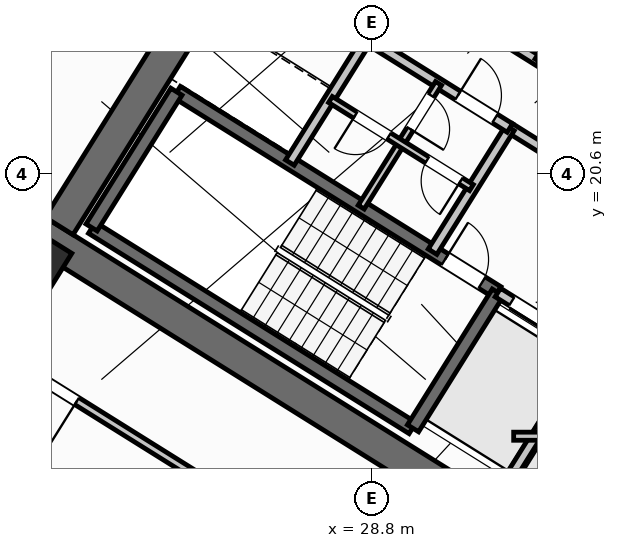
"""IFC4 building model, lengths in metres.
Left out: names, types, materials, properties, quantities, classifications, styles, units other than length and angle.
Written with IfcOpenShell. Run it as: python <this file> out.ifc"""

import sys

from ifc_helpers import new_model, si_unit, direction, frame, frame_2d, origin, origin_2d, place, context, subcontext, project, spatial, rectangle, hollow_rectangle, extrude, source, transform, mapped, element, fill, save


model = new_model("IFC4")
c1 = context("Model", 3, precision=1e-05, world=origin(), true_north=direction((0.0, 1.0)))
c2 = subcontext(c1, "Body", "Model", "MODEL_VIEW")
j1 = project(units=[si_unit("LENGTHUNIT", "METRE"), si_unit("PLANEANGLEUNIT", "RADIAN")], contexts=[c1])
p1 = place(None, origin())
s1 = spatial("IfcSite", under=j1, at=p1, CompositionType="ELEMENT")
p2 = place(p1, origin())
s2 = spatial("IfcBuilding", under=s1, at=p2, CompositionType="ELEMENT")
p3 = place(p2, frame((0.0, 0.0, 52.8)))
s3 = spatial("IfcBuildingStorey", under=s2, at=p3, CompositionType="ELEMENT", Elevation=52.8)
p4 = place(p3, frame((33.409, 12.45, 0.0), z_axis=(0.0, 0.0, 1.0), x_axis=(-0.848051132073, 0.529914405721, 0.0)))
e1 = element("IfcWall", 1, at=p4, inside=s3, PredefinedType="SHEAR", context=c2, shape_type="SweptSolid", body=[
    extrude(rectangle(XDim=13.24, YDim=0.65, at=frame_2d((6.62, 0.0))), origin(), (0.0, 0.0, 1.0), 3.35),
])
p5 = place(p3, frame((26.007, 24.976, 0.0), z_axis=(0.0, 0.0, 1.0), x_axis=(-0.529916319127, -0.848049936456, 0.0)))
e2 = element("IfcWall", 2, at=p5, inside=s3, PredefinedType="SHEAR", context=c2, shape_type="SweptSolid", body=[
    extrude(rectangle(XDim=6.375, YDim=0.65, at=frame_2d((3.188, 0.0))), origin(), (0.0, 0.0, 1.0), 3.35),
])
m1 = source(origin(), c2, "Body", "SweptSolid", [
    extrude(hollow_rectangle(XDim=1.0, YDim=1.0, WallThickness=0.04, at=origin_2d()), origin(), (0.0, 0.0, 1.0), 3.6),
])
p6 = place(p3, frame((22.191, 18.87, 0.0), z_axis=(0.0, 0.0, 1.0), x_axis=(-0.848048096156, 0.529919264233, 0.0)))
e3 = element("IfcColumn", 3, at=p6, inside=s3, PredefinedType="COLUMN", context=c2, shape_type="MappedRepresentation", body=[
    mapped(m1, transform((0.0, 0.0, 0.0), scale=1.0)),
])
p7 = place(p3, frame((29.268, 6.429, 0.0), z_axis=(0.0, 0.0, 1.0), x_axis=(-0.848049971435, 0.529916263149, 0.0)))
e4 = element("IfcWall", 4, at=p7, inside=s3, PredefinedType="STANDARD", context=c2, shape_type="SweptSolid", body=[
    extrude(rectangle(XDim=31.588, YDim=0.32, at=frame_2d((15.794, 0.0))), origin(), (0.0, 0.0, 1.0), 3.35),
])
p8 = place(p7, frame((16.362, 0.0, 0.0)))
e5 = element("IfcOpeningElement", 5, at=p8, cuts=e4, PredefinedType="OPENING", context=c2, shape_type="SweptSolid", body=[
    extrude(rectangle(XDim=1.2, YDim=2.15, at=frame_2d((0.6, 1.075))), frame((0.0, 0.17, 0.0), z_axis=(0.0, -1.0, 0.0), x_axis=(1.0, 0.0, 0.0)), (0.0, 0.0, 1.0), 0.34),
])
p9 = place(p7, frame((2.989, 0.0, 0.8)))
e6 = element("IfcOpeningElement", 6, at=p9, cuts=e4, PredefinedType="OPENING", context=c2, shape_type="SweptSolid", body=[
    extrude(rectangle(XDim=2.1, YDim=1.55, at=frame_2d((1.05, 0.775))), frame((0.0, 0.17, 0.0), z_axis=(0.0, -1.0, 0.0), x_axis=(1.0, 0.0, 0.0)), (0.0, 0.0, 1.0), 0.34),
])
p10 = place(p7, frame((8.359, 0.0, 0.8)))
e7 = element("IfcOpeningElement", 7, at=p10, cuts=e4, PredefinedType="OPENING", context=c2, shape_type="SweptSolid", body=[
    extrude(rectangle(XDim=2.1, YDim=1.55, at=frame_2d((1.05, 0.775))), frame((0.0, 0.17, 0.0), z_axis=(0.0, -1.0, 0.0), x_axis=(1.0, 0.0, 0.0)), (0.0, 0.0, 1.0), 0.34),
])
p11 = place(p7, frame((13.284, 0.0, 0.95)))
e8 = element("IfcOpeningElement", 8, at=p11, cuts=e4, PredefinedType="OPENING", context=c2, shape_type="SweptSolid", body=[
    extrude(rectangle(XDim=1.2, YDim=1.4, at=frame_2d((0.6, 0.7))), frame((0.0, 0.17, 0.0), z_axis=(0.0, -1.0, 0.0), x_axis=(1.0, 0.0, 0.0)), (0.0, 0.0, 1.0), 0.34),
])
p12 = place(p7, frame((20.259, 0.0, 0.95)))
e9 = element("IfcOpeningElement", 9, at=p12, cuts=e4, PredefinedType="OPENING", context=c2, shape_type="SweptSolid", body=[
    extrude(rectangle(XDim=1.2, YDim=1.4, at=frame_2d((0.6, 0.7))), frame((0.0, 0.17, 0.0), z_axis=(0.0, -1.0, 0.0), x_axis=(1.0, 0.0, 0.0)), (0.0, 0.0, 1.0), 0.34),
])
p13 = place(p7, frame((22.929, 0.0, 0.95)))
e10 = element("IfcOpeningElement", 10, at=p13, cuts=e4, PredefinedType="OPENING", context=c2, shape_type="SweptSolid", body=[
    extrude(rectangle(XDim=1.2, YDim=1.4, at=frame_2d((0.6, 0.7))), frame((0.0, 0.17, 0.0), z_axis=(0.0, -1.0, 0.0), x_axis=(1.0, 0.0, 0.0)), (0.0, 0.0, 1.0), 0.34),
])
p14 = place(p7, frame((26.106, 0.0, 0.85)))
e11 = element("IfcOpeningElement", 11, at=p14, cuts=e4, PredefinedType="OPENING", context=c2, shape_type="SweptSolid", body=[
    extrude(rectangle(XDim=1.5, YDim=1.5, at=frame_2d((0.75, 0.75))), frame((0.0, 0.17, 0.0), z_axis=(0.0, -1.0, 0.0), x_axis=(1.0, 0.0, 0.0)), (0.0, 0.0, 1.0), 0.34),
])
p15 = place(p7, frame((29.068, 0.0, 0.85)))
e12 = element("IfcOpeningElement", 12, at=p15, cuts=e4, PredefinedType="OPENING", context=c2, shape_type="SweptSolid", body=[
    extrude(rectangle(XDim=1.8, YDim=1.5, at=frame_2d((0.9, 0.75))), frame((0.0, 0.17, 0.0), z_axis=(0.0, -1.0, 0.0), x_axis=(1.0, 0.0, 0.0)), (0.0, 0.0, 1.0), 0.34),
])
p16 = place(p3, frame((29.605, 15.581, 0.0), z_axis=(0.0, 0.0, 1.0), x_axis=(-0.848036911448, 0.529937163087, 0.0)))
e13 = element("IfcWall", 13, at=p16, inside=s3, PredefinedType="SHEAR", context=c2, shape_type="SweptSolid", body=[
    extrude(rectangle(XDim=7.46, YDim=0.26, at=frame_2d((3.73, 0.0))), origin(), (0.0, 0.0, 1.0), 3.35),
])
p17 = place(p3, frame((31.28, 18.261, 0.0), z_axis=(0.0, 0.0, 1.0), x_axis=(-0.848051618787, 0.529913626805, 0.0)))
e14 = element("IfcWall", 14, at=p17, inside=s3, PredefinedType="SHEAR", context=c2, shape_type="SweptSolid", body=[
    extrude(rectangle(XDim=7.46, YDim=0.26, at=frame_2d((3.73, 0.0))), origin(), (0.0, 0.0, 1.0), 3.35),
])
p18 = place(p17, frame((0.36, 0.0, 0.0)))
e15 = element("IfcOpeningElement", 15, at=p18, cuts=e14, PredefinedType="OPENING", context=c2, shape_type="SweptSolid", body=[
    extrude(rectangle(XDim=0.86, YDim=2.05, at=frame_2d((0.43, 1.025))), frame((0.0, 0.14, 0.0), z_axis=(0.0, -1.0, 0.0), x_axis=(1.0, 0.0, 0.0)), (0.0, 0.0, 1.0), 0.28),
])
p19 = place(p3, frame((31.288, 18.256, 0.0), z_axis=(0.0, 0.0, 1.0), x_axis=(-0.529943379326, -0.848033026897, 0.0)))
e16 = element("IfcWall", 16, at=p19, inside=s3, PredefinedType="SHEAR", context=c2, shape_type="SweptSolid", body=[
    extrude(rectangle(XDim=3.16, YDim=0.26, at=frame_2d((1.58, 0.0))), origin(), (0.0, 0.0, 1.0), 3.35),
])
p20 = place(p3, frame((24.945, 22.22, 0.0), z_axis=(0.0, 0.0, 1.0), x_axis=(-0.529908658664, -0.84805472316, 0.0)))
e17 = element("IfcWall", 17, at=p20, inside=s3, PredefinedType="SHEAR", context=c2, shape_type="SweptSolid", body=[
    extrude(rectangle(XDim=3.16, YDim=0.26, at=frame_2d((1.58, 0.0))), origin(), (0.0, 0.0, 1.0), 3.35),
])
p21 = place(p3, frame((38.046, 21.108, 0.0), z_axis=(0.0, 0.0, 1.0), x_axis=(-0.848054434086, 0.529909121291, 0.0)))
e18 = element("IfcWall", 18, at=p21, inside=s3, PredefinedType="SHEAR", context=c2, shape_type="SweptSolid", body=[
    extrude(rectangle(XDim=7.33, YDim=0.26, at=frame_2d((3.665, 0.0))), origin(), (0.0, 0.0, 1.0), 3.35),
])
p22 = place(p21, frame((0.22, 0.0, 0.0)))
e19 = element("IfcOpeningElement", 19, at=p22, cuts=e18, PredefinedType="OPENING", context=c2, shape_type="SweptSolid", body=[
    extrude(rectangle(XDim=1.1, YDim=2.1, at=frame_2d((0.55, 1.05))), frame((0.0, 0.14, 0.0), z_axis=(0.0, -1.0, 0.0), x_axis=(1.0, 0.0, 0.0)), (0.0, 0.0, 1.0), 0.28),
])
p23 = place(p3, frame((34.848, 16.031, 0.0), z_axis=(0.0, 0.0, 1.0), x_axis=(-0.848044042236, 0.529925751807, 0.0)))
e20 = element("IfcWall", 20, at=p23, inside=s3, PredefinedType="STANDARD", context=c2, shape_type="SweptSolid", body=[
    extrude(rectangle(XDim=4.198, YDim=0.2, at=frame_2d((2.099, 0.0))), origin(), (0.0, 0.0, 1.0), 3.34),
])
p24 = place(p23, frame((0.348, 0.0, 0.0)))
e21 = element("IfcOpeningElement", 21, at=p24, cuts=e20, PredefinedType="OPENING", context=c2, shape_type="SweptSolid", body=[
    extrude(rectangle(XDim=1.3, YDim=2.2, at=frame_2d((0.65, 1.1))), frame((0.0, 0.11, 0.0), z_axis=(0.0, -1.0, 0.0), x_axis=(1.0, 0.0, 0.0)), (0.0, 0.0, 1.0), 0.22),
])
p25 = place(p23, frame((2.423, 0.0, 0.0)))
e22 = element("IfcOpeningElement", 22, at=p25, cuts=e20, PredefinedType="OPENING", context=c2, shape_type="SweptSolid", body=[
    extrude(rectangle(XDim=1.45, YDim=2.25, at=frame_2d((0.725, 1.125))), frame((0.0, 0.11, 0.0), z_axis=(0.0, -1.0, 0.0), x_axis=(1.0, 0.0, 0.0)), (0.0, 0.0, 1.0), 0.22),
])
p26 = place(p3, frame((36.374, 18.474, 0.0), z_axis=(0.0, 0.0, 1.0), x_axis=(-0.848051071577, 0.529914502535, 0.0)))
e23 = element("IfcWall", 23, at=p26, inside=s3, PredefinedType="STANDARD", context=c2, shape_type="SweptSolid", body=[
    extrude(rectangle(XDim=5.718, YDim=0.2, at=frame_2d((2.859, 0.0))), origin(), (0.0, 0.0, 1.0), 3.34),
])
p27 = place(p26, frame((2.498, 0.0, 0.0)))
e24 = element("IfcOpeningElement", 24, at=p27, cuts=e23, PredefinedType="OPENING", context=c2, shape_type="SweptSolid", body=[
    extrude(rectangle(XDim=1.15, YDim=2.1, at=frame_2d((0.575, 1.05))), frame((0.0, 0.11, 0.0), z_axis=(0.0, -1.0, 0.0), x_axis=(1.0, 0.0, 0.0)), (0.0, 0.0, 1.0), 0.22),
])
p28 = place(p3, frame((32.108, 22.814, 0.0), z_axis=(0.0, 0.0, 1.0), x_axis=(-0.848042229521, 0.529928652696, 0.0)))
e25 = element("IfcWall", 25, at=p28, inside=s3, PredefinedType="STANDARD", context=c2, shape_type="SweptSolid", body=[
    extrude(rectangle(XDim=5.62, YDim=0.2, at=frame_2d((2.81, 0.0))), origin(), (0.0, 0.0, 1.0), 3.34),
])
p29 = place(p3, frame((32.982, 24.213, 0.0), z_axis=(0.0, 0.0, 1.0), x_axis=(-0.529839334948, -0.84809803628, 0.0)))
e26 = element("IfcWall", 26, at=p29, inside=s3, PredefinedType="STANDARD", context=c2, shape_type="SweptSolid", body=[
    extrude(rectangle(XDim=1.65, YDim=0.2, at=frame_2d((0.825, 0.0))), origin(), (0.0, 0.0, 1.0), 3.34),
])
p30 = place(p3, frame((33.029, 17.003, 0.0), z_axis=(0.0, 0.0, 1.0), x_axis=(-0.529916267533, -0.848049968695, 0.0)))
e27 = element("IfcWall", 27, at=p30, inside=s3, PredefinedType="STANDARD", context=c2, shape_type="SweptSolid", body=[
    extrude(rectangle(XDim=2.92, YDim=0.2, at=frame_2d((1.46, 0.0))), origin(), (0.0, 0.0, 1.0), 3.34),
])
for number, where, z_axis, x_axis in (
    (28, (31.525, 21.504, 0.0), (0.0, 0.0, 1.0), (-0.53, -0.848, 0.0)),
    (29, (28.71, 23.263, 0.0), (0.0, 0.0, 1.0), (-0.53, -0.848, 0.0)),
):
    element("IfcWall", number, at=place(p3, frame(where, z_axis=z_axis, x_axis=x_axis)), inside=s3, PredefinedType="STANDARD", context=c2, shape_type="SweptSolid", body=[
        extrude(rectangle(XDim=2.88, YDim=0.2, at=frame_2d((1.44, 0.0))), origin(), (0.0, 0.0, 1.0), 3.34),
    ])
p31 = place(p3, frame((31.525, 21.504, 0.0), z_axis=(0.0, 0.0, 1.0), x_axis=(-0.848044998614, 0.529924221305, 0.0)))
e30 = element("IfcWall", 30, at=p31, inside=s3, PredefinedType="STANDARD", context=c2, shape_type="SweptSolid", body=[
    extrude(rectangle(XDim=6.168, YDim=0.2, at=frame_2d((3.084, 0.0))), origin(), (0.0, 0.0, 1.0), 3.34),
])
p32 = place(p31, frame((4.4, 0.0, 0.0)))
e31 = element("IfcOpeningElement", 31, at=p32, cuts=e30, PredefinedType="OPENING", context=c2, shape_type="SweptSolid", body=[
    extrude(rectangle(XDim=0.86, YDim=2.05, at=frame_2d((0.43, 1.025))), frame((0.0, 0.11, 0.0), z_axis=(0.0, -1.0, 0.0), x_axis=(1.0, 0.0, 0.0)), (0.0, 0.0, 1.0), 0.22),
])
p33 = place(p31, frame((0.35, 0.0, 0.0)))
e32 = element("IfcOpeningElement", 32, at=p33, cuts=e30, PredefinedType="OPENING", context=c2, shape_type="SweptSolid", body=[
    extrude(rectangle(XDim=0.86, YDim=2.05, at=frame_2d((0.43, 1.025))), frame((0.0, 0.11, 0.0), z_axis=(0.0, -1.0, 0.0), x_axis=(1.0, 0.0, 0.0)), (0.0, 0.0, 1.0), 0.22),
])
p34 = place(p3, frame((30.117, 22.384, 0.0), z_axis=(0.0, 0.0, 1.0), x_axis=(-0.529951914384, -0.848027693204, 0.0)))
e33 = element("IfcWall", 33, at=p34, inside=s3, PredefinedType="PLUMBINGWALL", context=c2, shape_type="SweptSolid", body=[
    extrude(rectangle(XDim=1.4, YDim=0.14, at=frame_2d((0.7, 0.0))), origin(), (0.0, 0.0, 1.0), 3.34),
])
p35 = place(p34, frame((0.28, 0.0, 0.0)))
e34 = element("IfcOpeningElement", 34, at=p35, cuts=e33, PredefinedType="OPENING", context=c2, shape_type="SweptSolid", body=[
    extrude(rectangle(XDim=0.78, YDim=2.05, at=frame_2d((0.39, 1.025))), frame((0.0, 0.08, 0.0), z_axis=(0.0, -1.0, 0.0), x_axis=(1.0, 0.0, 0.0)), (0.0, 0.0, 1.0), 0.16),
])
p36 = place(p3, frame((29.375, 21.196, 0.0), z_axis=(0.0, 0.0, 1.0), x_axis=(-0.529865479138, -0.848081702443, 0.0)))
e35 = element("IfcWall", 35, at=p36, inside=s3, PredefinedType="PLUMBINGWALL", context=c2, shape_type="SweptSolid", body=[
    extrude(rectangle(XDim=1.48, YDim=0.14, at=frame_2d((0.74, 0.0))), origin(), (0.0, 0.0, 1.0), 3.34),
])
p37 = place(p3, frame((30.766, 20.327, 0.0), z_axis=(0.0, 0.0, 1.0), x_axis=(-0.848052663127, 0.529911955482, 0.0)))
e36 = element("IfcWall", 36, at=p37, inside=s3, PredefinedType="PLUMBINGWALL", context=c2, shape_type="SweptSolid", body=[
    extrude(rectangle(XDim=3.28, YDim=0.14, at=frame_2d((1.64, 0.0))), origin(), (0.0, 0.0, 1.0), 3.34),
])
p38 = place(p37, frame((0.25, 0.0, 0.0)))
e37 = element("IfcOpeningElement", 37, at=p38, cuts=e36, PredefinedType="OPENING", context=c2, shape_type="SweptSolid", body=[
    extrude(rectangle(XDim=0.78, YDim=2.05, at=frame_2d((0.39, 1.025))), frame((0.0, 0.08, 0.0), z_axis=(0.0, -1.0, 0.0), x_axis=(1.0, 0.0, 0.0)), (0.0, 0.0, 1.0), 0.16),
])
p39 = place(p37, frame((1.92, 0.0, 0.0)))
e38 = element("IfcOpeningElement", 38, at=p39, cuts=e36, PredefinedType="OPENING", context=c2, shape_type="SweptSolid", body=[
    extrude(rectangle(XDim=0.78, YDim=2.05, at=frame_2d((0.39, 1.025))), frame((0.0, 0.08, 0.0), z_axis=(0.0, -1.0, 0.0), x_axis=(1.0, 0.0, 0.0)), (0.0, 0.0, 1.0), 0.16),
])
p40 = place(p3, frame((32.164, 10.374, 0.0), z_axis=(0.0, 0.0, 1.0), x_axis=(-0.848044107957, 0.529925646633, 0.0)))
e39 = element("IfcWall", 39, at=p40, inside=s3, PredefinedType="PARTITIONING", context=c2, shape_type="SweptSolid", body=[
    extrude(rectangle(XDim=15.57, YDim=0.16, at=frame_2d((7.785, 0.0))), origin(), (0.0, 0.0, 1.0), 3.34),
])
p41 = place(p40, frame((10.83, 0.0, 0.0)))
e40 = element("IfcOpeningElement", 40, at=p41, cuts=e39, PredefinedType="OPENING", context=c2, shape_type="SweptSolid", body=[
    extrude(rectangle(XDim=1.0, YDim=2.1, at=frame_2d((0.5, 1.05))), frame((0.0, 0.09, 0.0), z_axis=(0.0, -1.0, 0.0), x_axis=(1.0, 0.0, 0.0)), (0.0, 0.0, 1.0), 0.18),
])
p42 = place(p3, frame((29.72, 8.859, 0.0), z_axis=(0.0, 0.0, 1.0), x_axis=(-0.848049134363, 0.529917602752, 0.0)))
e41 = element("IfcWall", 41, at=p42, inside=s3, PredefinedType="PLUMBINGWALL", context=c2, shape_type="SweptSolid", body=[
    extrude(rectangle(XDim=14.3, YDim=0.14, at=frame_2d((7.15, 0.0))), origin(), (0.0, 0.0, 1.0), 3.34),
])
p43 = place(p42, frame((9.57, 0.0, 0.0)))
e42 = element("IfcOpeningElement", 42, at=p43, cuts=e41, PredefinedType="OPENING", context=c2, shape_type="SweptSolid", body=[
    extrude(rectangle(XDim=0.92, YDim=2.08, at=frame_2d((0.46, 1.04))), frame((0.0, 0.08, 0.0), z_axis=(0.0, -1.0, 0.0), x_axis=(1.0, 0.0, 0.0)), (0.0, 0.0, 1.0), 0.16),
])
p44 = place(p3, frame((31.6, 15.42, 0.0), z_axis=(0.0, 0.0, 1.0), x_axis=(1.0, 0.0, 0.0)))
e43 = element("IfcWall", 43, at=p44, inside=s3, PredefinedType="PARTITIONING", context=c2, shape_type="SweptSolid", body=[
    extrude(rectangle(XDim=2.866, YDim=0.16, at=frame_2d((1.433, 0.0))), origin(), (0.0, 0.0, 1.0), 3.34),
])
m2 = source(origin(), c2, "Body", "SweptSolid", [
    extrude(rectangle(XDim=0.86, YDim=2.05, at=frame_2d((0.43, 1.025))), frame((0.0, 0.025, 0.0), z_axis=(0.0, -1.0, 0.0), x_axis=(1.0, 0.0, 0.0)), (0.0, 0.0, 1.0), 0.05),
])
p45 = place(p18, frame((0.86, 0.0, 0.0), z_axis=(0.0, 0.0, 1.0), x_axis=(-1.0, 0.0, 0.0)))
e44 = element("IfcDoor", 44, at=p45, inside=s3, OperationType="SINGLE_SWING_LEFT", PredefinedType="DOOR", context=c2, shape_type="MappedRepresentation", body=[
    mapped(m2, transform((0.0, 0.0, 0.0), scale=1.0)),
])
fill(e15, e44)
m3 = source(origin(), c2, "Body", "SweptSolid", [
    extrude(rectangle(XDim=1.45, YDim=2.25, at=frame_2d((0.725, 1.125))), frame((0.0, 0.025, 0.0), z_axis=(0.0, -1.0, 0.0), x_axis=(1.0, 0.0, 0.0)), (0.0, 0.0, 1.0), 0.05),
])
p46 = place(p25, origin())
e45 = element("IfcDoor", 45, at=p46, inside=s3, OperationType="DOUBLE_DOOR_SLIDING", PredefinedType="DOOR", context=c2, shape_type="MappedRepresentation", body=[
    mapped(m3, transform((0.0, 0.0, 0.0), scale=1.0)),
])
fill(e22, e45)
p47 = place(p33, frame((0.86, 0.0, 0.0), z_axis=(0.0, 0.0, 1.0), x_axis=(-1.0, 0.0, 0.0)))
e46 = element("IfcDoor", 46, at=p47, inside=s3, OperationType="SINGLE_SWING_LEFT", PredefinedType="DOOR", context=c2, shape_type="MappedRepresentation", body=[
    mapped(m2, transform((0.0, 0.0, 0.0), scale=1.0)),
])
fill(e32, e46)
m4 = source(origin(), c2, "Body", "SweptSolid", [
    extrude(rectangle(XDim=0.78, YDim=2.05, at=frame_2d((0.39, 1.025))), frame((0.0, 0.025, 0.0), z_axis=(0.0, -1.0, 0.0), x_axis=(1.0, 0.0, 0.0)), (0.0, 0.0, 1.0), 0.05),
])
p48 = place(p35, origin())
e47 = element("IfcDoor", 47, at=p48, inside=s3, OperationType="SINGLE_SWING_RIGHT", PredefinedType="DOOR", context=c2, shape_type="MappedRepresentation", body=[
    mapped(m4, transform((0.0, 0.0, 0.0), scale=1.0)),
])
fill(e34, e47)
p49 = place(p38, origin())
e48 = element("IfcDoor", 48, at=p49, inside=s3, OperationType="SINGLE_SWING_LEFT", PredefinedType="DOOR", context=c2, shape_type="MappedRepresentation", body=[
    mapped(m4, transform((0.0, 0.0, 0.0), scale=1.0)),
])
fill(e37, e48)
p50 = place(p39, origin())
e49 = element("IfcDoor", 49, at=p50, inside=s3, OperationType="SINGLE_SWING_RIGHT", PredefinedType="DOOR", context=c2, shape_type="MappedRepresentation", body=[
    mapped(m4, transform((0.0, 0.0, 0.0), scale=1.0)),
])
fill(e38, e49)
m5 = source(origin(), c2, "Body", "SweptSolid", [
    extrude(rectangle(XDim=1.0, YDim=2.1, at=frame_2d((0.5, 1.05))), frame((0.0, 0.025, 0.0), z_axis=(0.0, -1.0, 0.0), x_axis=(1.0, 0.0, 0.0)), (0.0, 0.0, 1.0), 0.05),
])
p51 = place(p41, origin())
e50 = element("IfcDoor", 50, at=p51, inside=s3, OperationType="SINGLE_SWING_LEFT", PredefinedType="DOOR", context=c2, shape_type="MappedRepresentation", body=[
    mapped(m5, transform((0.0, 0.0, 0.0), scale=1.0)),
])
fill(e40, e50)
save(model, sys.argv[1])
